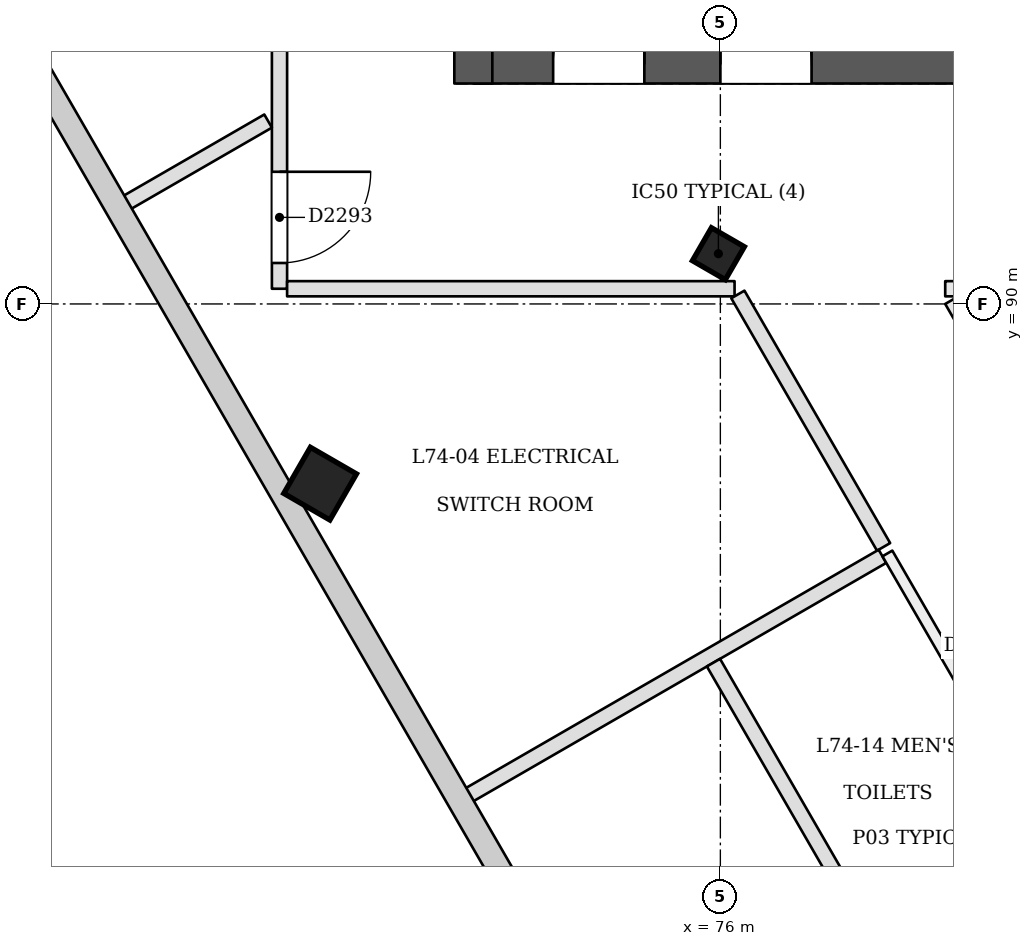
"""IFC4 building model, lengths in metres.
Left out: names, types, materials, properties, quantities, classifications, styles, units other than length and angle.
Written with IfcOpenShell. Run it as: python <this file> out.ifc"""

import sys

from ifc_helpers import new_model, si_unit, direction, frame, frame_2d, origin, origin_2d, place, context, subcontext, project, spatial, rectangle, extrude, element, fill, save


model = new_model("IFC4")
c1 = context("Model", 3, precision=1e-05, world=origin(), true_north=direction((0.0, 1.0)))
c2 = subcontext(c1, "Body", "Model", "MODEL_VIEW")
j1 = project(units=[si_unit("LENGTHUNIT", "METRE"), si_unit("PLANEANGLEUNIT", "RADIAN")], contexts=[c1])
p1 = place(None, origin())
s1 = spatial("IfcSite", under=j1, at=p1, CompositionType="ELEMENT")
p2 = place(p1, origin())
s2 = spatial("IfcBuilding", under=s1, at=p2, CompositionType="ELEMENT")
p3 = place(p2, frame((0.0, 0.0, 286.0)))
s3 = spatial("IfcBuildingStorey", under=s2, at=p3, CompositionType="ELEMENT", Elevation=286.0)
p4 = place(p3, frame((72.75, 93.15, 0.0), z_axis=(0.0, 0.0, 1.0), x_axis=(1.0, 0.0, 0.0)))
e1 = element("IfcWall", 1, at=p4, inside=s3, PredefinedType="SHEAR", context=c2, shape_type="SweptSolid", body=[
    extrude(rectangle(XDim=24.75, YDim=0.5, at=frame_2d((12.375, 0.0))), origin(), (0.0, 0.0, 1.0), 5.4),
])
p5 = place(p4, frame((1.05, 0.0, 0.0)))
e2 = element("IfcOpeningElement", 2, at=p5, cuts=e1, PredefinedType="OPENING", context=c2, shape_type="SweptSolid", body=[
    extrude(rectangle(XDim=1.2, YDim=2.1, at=frame_2d((0.6, 1.05))), frame((0.0, 0.26, 0.0), z_axis=(0.0, -1.0, 0.0), x_axis=(1.0, 0.0, 0.0)), (0.0, 0.0, 1.0), 0.521),
])
p6 = place(p4, frame((3.25, 0.0, 0.0)))
e3 = element("IfcOpeningElement", 3, at=p6, cuts=e1, PredefinedType="OPENING", context=c2, shape_type="SweptSolid", body=[
    extrude(rectangle(XDim=1.2, YDim=2.1, at=frame_2d((0.6, 1.05))), frame((0.0, 0.26, 0.0), z_axis=(0.0, -1.0, 0.0), x_axis=(1.0, 0.0, 0.0)), (0.0, 0.0, 1.0), 0.521),
])
p7 = place(p4, frame((13.25, 0.0, 0.0)))
e4 = element("IfcOpeningElement", 4, at=p7, cuts=e1, PredefinedType="OPENING", context=c2, shape_type="SweptSolid", body=[
    extrude(rectangle(XDim=1.2, YDim=2.1, at=frame_2d((0.6, 1.05))), frame((0.0, 0.26, 0.0), z_axis=(0.0, -1.0, 0.0), x_axis=(1.0, 0.0, 0.0)), (0.0, 0.0, 1.0), 0.521),
])
p8 = place(p4, frame((21.55, 0.0, 0.0)))
e5 = element("IfcOpeningElement", 5, at=p8, cuts=e1, PredefinedType="OPENING", context=c2, shape_type="SweptSolid", body=[
    extrude(rectangle(XDim=1.2, YDim=2.1, at=frame_2d((0.6, 1.05))), frame((0.0, 0.26, 0.0), z_axis=(0.0, -1.0, 0.0), x_axis=(1.0, 0.0, 0.0)), (0.0, 0.0, 1.0), 0.521),
])
p9 = place(p3, frame((72.75, 103.65, 0.0), z_axis=(0.0, 0.0, 1.0), x_axis=(0.0, -1.0, 0.0)))
e6 = element("IfcWall", 6, at=p9, inside=s3, PredefinedType="SHEAR", context=c2, shape_type="SweptSolid", body=[
    extrude(rectangle(XDim=10.75, YDim=0.5, at=frame_2d((5.375, 0.0))), origin(), (0.0, 0.0, 1.0), 5.4),
])
p10 = place(p3, frame((75.947, 90.614, -0.015), z_axis=(0.022222390212, 0.038437508274, 0.999013875445), x_axis=(-0.865893194874, -0.498748945877, 0.038450800471)))
e7 = element("IfcColumn", 7, at=p10, inside=s3, PredefinedType="COLUMN", context=c2, shape_type="SweptSolid", body=[
    extrude(rectangle(XDim=0.5, YDim=0.5, at=origin_2d()), origin(), (0.0, 0.0, 1.0), 5.405),
])
p11 = place(p3, frame((70.708, 87.59, 0.0), z_axis=(0.02217724499, 0.038437546816, 0.999014877166), x_axis=(-0.865453806352, -0.499512508445, 0.038431276047)))
e8 = element("IfcColumn", 8, at=p11, inside=s3, PredefinedType="COLUMN", context=c2, shape_type="SweptSolid", body=[
    extrude(rectangle(XDim=0.7, YDim=0.7, at=origin_2d()), origin(), (0.0, 0.0, 1.0), 5.405),
])
p12 = place(p3, frame((70.2, 99.19, 0.0), z_axis=(0.0, 0.0, 1.0), x_axis=(0.0, -1.0, 0.0)))
e9 = element("IfcWall", 9, at=p12, inside=s3, PredefinedType="PARTITIONING", context=c2, shape_type="SweptSolid", body=[
    extrude(rectangle(XDim=8.99, YDim=0.2, at=frame_2d((4.495, 0.0))), origin(), (0.0, 0.0, 1.0), 5.0),
])
p13 = place(p12, frame((0.2, 0.0, 0.0)))
e10 = element("IfcOpeningElement", 10, at=p13, cuts=e9, PredefinedType="OPENING", context=c2, shape_type="SweptSolid", body=[
    extrude(rectangle(XDim=1.2, YDim=2.4, at=frame_2d((0.6, 1.2))), frame((0.0, 0.11, 0.0), z_axis=(0.0, -1.0, 0.0), x_axis=(1.0, 0.0, 0.0)), (0.0, 0.0, 1.0), 0.221),
])
p14 = place(p12, frame((4.178, 0.0, 0.0)))
e11 = element("IfcOpeningElement", 11, at=p14, cuts=e9, PredefinedType="OPENING", context=c2, shape_type="SweptSolid", body=[
    extrude(rectangle(XDim=1.2, YDim=2.4, at=frame_2d((0.6, 1.2))), frame((0.0, 0.11, 0.0), z_axis=(0.0, -1.0, 0.0), x_axis=(1.0, 0.0, 0.0)), (0.0, 0.0, 1.0), 0.221),
])
p15 = place(p12, frame((7.451, 0.0, 0.0)))
e12 = element("IfcOpeningElement", 12, at=p15, cuts=e9, PredefinedType="OPENING", context=c2, shape_type="SweptSolid", body=[
    extrude(rectangle(XDim=1.2, YDim=2.4, at=frame_2d((0.6, 1.2))), frame((0.0, 0.11, 0.0), z_axis=(0.0, -1.0, 0.0), x_axis=(1.0, 0.0, 0.0)), (0.0, 0.0, 1.0), 0.221),
])
p16 = place(p3, frame((70.3, 90.2, 0.0), z_axis=(0.0, 0.0, 1.0), x_axis=(1.0, 0.0, 0.0)))
e13 = element("IfcWall", 13, at=p16, inside=s3, PredefinedType="PARTITIONING", context=c2, shape_type="SweptSolid", body=[
    extrude(rectangle(XDim=5.887, YDim=0.2, at=frame_2d((2.943, 0.0))), origin(), (0.0, 0.0, 1.0), 5.0),
])
p17 = place(p3, frame((76.23, 90.125, 0.0), z_axis=(0.0, 0.0, 1.0), x_axis=(0.499994348001, -0.866028666943, 0.0)))
e14 = element("IfcWall", 14, at=p17, inside=s3, PredefinedType="PARTITIONING", context=c2, shape_type="SweptSolid", body=[
    extrude(rectangle(XDim=3.834, YDim=0.2, at=frame_2d((1.917, 0.0))), origin(), (0.0, 0.0, 1.0), 5.0),
])
p18 = place(p3, frame((78.958, 90.2, 0.0), z_axis=(0.0, 0.0, 1.0), x_axis=(1.0, 0.0, 0.0)))
e15 = element("IfcWall", 15, at=p18, inside=s3, PredefinedType="PARTITIONING", context=c2, shape_type="SweptSolid", body=[
    extrude(rectangle(XDim=12.083, YDim=0.2, at=frame_2d((6.042, 0.0))), origin(), (0.0, 0.0, 1.0), 5.0),
])
p19 = place(p18, frame((5.442, 0.0, 0.0)))
e16 = element("IfcOpeningElement", 16, at=p19, cuts=e15, PredefinedType="OPENING", context=c2, shape_type="SweptSolid", body=[
    extrude(rectangle(XDim=1.2, YDim=2.4, at=frame_2d((0.6, 1.2))), frame((0.0, 0.11, 0.0), z_axis=(0.0, -1.0, 0.0), x_axis=(1.0, 0.0, 0.0)), (0.0, 0.0, 1.0), 0.221),
])
p20 = place(p3, frame((84.913, 79.885, 0.0), z_axis=(0.0, 0.0, 1.0), x_axis=(-0.500000336066, 0.866025209756, 0.0)))
e17 = element("IfcWall", 17, at=p20, inside=s3, PredefinedType="PARTITIONING", context=c2, shape_type="SweptSolid", body=[
    extrude(rectangle(XDim=11.737, YDim=0.2, at=frame_2d((5.869, 0.0))), origin(), (0.0, 0.0, 1.0), 5.0),
])
p21 = place(p3, frame((78.198, 86.718, 0.0), z_axis=(0.0, 0.0, 1.0), x_axis=(0.500002395808, -0.866024020559, 0.0)))
e18 = element("IfcWall", 18, at=p21, inside=s3, PredefinedType="PARTITIONING", context=c2, shape_type="SweptSolid", body=[
    extrude(rectangle(XDim=11.5, YDim=0.15, at=frame_2d((5.75, 0.0))), origin(), (0.0, 0.0, 1.0), 4.6),
])
p22 = place(p21, frame((1.884, 0.0, 0.0)))
e19 = element("IfcOpeningElement", 19, at=p22, cuts=e18, PredefinedType="OPENING", context=c2, shape_type="SweptSolid", body=[
    extrude(rectangle(XDim=0.9, YDim=2.1, at=frame_2d((0.45, 1.05))), frame((0.0, 0.085, 0.0), z_axis=(0.0, -1.0, 0.0), x_axis=(1.0, 0.0, 0.0)), (0.0, 0.0, 1.0), 0.171),
])
p23 = place(p21, frame((6.402, 0.0, 0.0)))
e20 = element("IfcOpeningElement", 20, at=p23, cuts=e18, PredefinedType="OPENING", context=c2, shape_type="SweptSolid", body=[
    extrude(rectangle(XDim=0.9, YDim=2.1, at=frame_2d((0.45, 1.05))), frame((0.0, 0.085, 0.0), z_axis=(0.0, -1.0, 0.0), x_axis=(1.0, 0.0, 0.0)), (0.0, 0.0, 1.0), 0.171),
])
p24 = place(p21, frame((9.818, 0.0, 0.0)))
e21 = element("IfcOpeningElement", 21, at=p24, cuts=e18, PredefinedType="OPENING", context=c2, shape_type="SweptSolid", body=[
    extrude(rectangle(XDim=0.9, YDim=2.1, at=frame_2d((0.45, 1.05))), frame((0.0, 0.085, 0.0), z_axis=(0.0, -1.0, 0.0), x_axis=(1.0, 0.0, 0.0)), (0.0, 0.0, 1.0), 0.171),
])
p25 = place(p3, frame((68.155, 91.312, 0.0), z_axis=(0.0, 0.0, 1.0), x_axis=(0.86602396135, 0.500002498361, 0.0)))
e22 = element("IfcWall", 22, at=p25, inside=s3, PredefinedType="PARTITIONING", context=c2, shape_type="SweptSolid", body=[
    extrude(rectangle(XDim=2.188, YDim=0.2, at=frame_2d((1.094, 0.0))), origin(), (0.0, 0.0, 1.0), 5.0),
])
p26 = place(p3, frame((72.655, 83.518, 0.0), z_axis=(0.0, 0.0, 1.0), x_axis=(0.866025537322, 0.499999768706, 0.0)))
e23 = element("IfcWall", 23, at=p26, inside=s3, PredefinedType="PARTITIONING", context=c2, shape_type="SweptSolid", body=[
    extrude(rectangle(XDim=6.325, YDim=0.2, at=frame_2d((3.163, 0.0))), origin(), (0.0, 0.0, 1.0), 5.0),
])
p27 = place(p3, frame((81.609, 75.408, 0.0), z_axis=(0.0, 0.0, 1.0), x_axis=(-0.500001763848, 0.866024385424, 0.0)))
e24 = element("IfcWall", 24, at=p27, inside=s3, PredefinedType="PARTITIONING", context=c2, shape_type="SweptSolid", body=[
    extrude(rectangle(XDim=11.4, YDim=0.2, at=frame_2d((5.7, 0.0))), origin(), (0.0, 0.0, 1.0), 4.6),
])
p28 = place(p3, frame((78.28, 81.375, 0.0), z_axis=(0.0, 0.0, 1.0), x_axis=(0.866039067339, 0.499976333282, 0.0)))
e25 = element("IfcWall", 25, at=p28, inside=s3, PredefinedType="PARTITIONING", context=c2, shape_type="SweptSolid", body=[
    extrude(rectangle(XDim=2.525, YDim=0.1, at=frame_2d((1.262, 0.0))), origin(), (0.0, 0.0, 1.0), 5.0),
])
p29 = place(p15, origin())
e26 = element("IfcDoor", 26, at=p29, inside=s3, OperationType="SINGLE_SWING_LEFT", PredefinedType="NOTDEFINED", context=c2, shape_type="SweptSolid", body=[
    extrude(rectangle(XDim=1.2, YDim=2.4, at=frame_2d((0.6, 1.2))), frame((0.0, 0.025, 0.0), z_axis=(0.0, -1.0, 0.0), x_axis=(1.0, 0.0, 0.0)), (0.0, 0.0, 1.0), 0.05),
])
fill(e12, e26)
p30 = place(p5, origin())
e27 = element("IfcDoor", 27, at=p30, inside=s3, OperationType="SINGLE_SWING_RIGHT", PredefinedType="NOTDEFINED", context=c2, shape_type="SweptSolid", body=[
    extrude(rectangle(XDim=1.2, YDim=2.1, at=frame_2d((0.6, 1.05))), frame((0.0, 0.025, 0.0), z_axis=(0.0, -1.0, 0.0), x_axis=(1.0, 0.0, 0.0)), (0.0, 0.0, 1.0), 0.05),
])
fill(e2, e27)
p31 = place(p6, origin())
e28 = element("IfcDoor", 28, at=p31, inside=s3, OperationType="SINGLE_SWING_LEFT", PredefinedType="NOTDEFINED", context=c2, shape_type="SweptSolid", body=[
    extrude(rectangle(XDim=1.2, YDim=2.1, at=frame_2d((0.6, 1.05))), frame((0.0, 0.025, 0.0), z_axis=(0.0, -1.0, 0.0), x_axis=(1.0, 0.0, 0.0)), (0.0, 0.0, 1.0), 0.05),
])
fill(e3, e28)
save(model, sys.argv[1])
